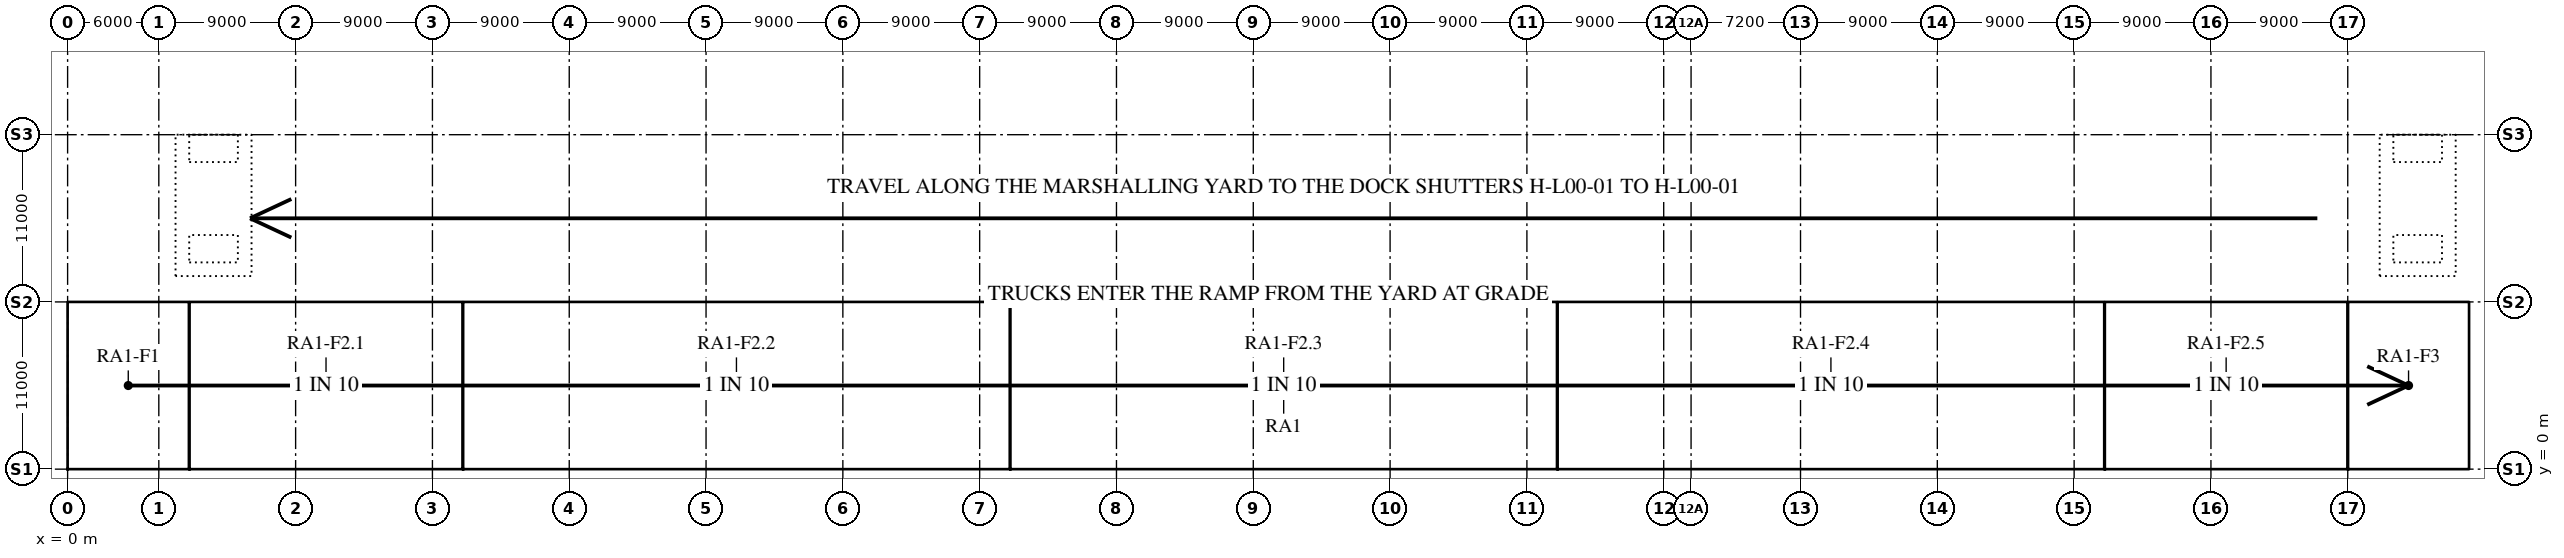
"""IFC4 building model, lengths in metres.
Left out: names, types, materials, properties, quantities, classifications, styles, units other than length and angle.
Written with IfcOpenShell. Run it as: python <this file> out.ifc"""

import sys

from ifc_helpers import new_model, si_unit, direction, frame, origin, origin_2d, place, context, subcontext, project, spatial, rectangle, extrude, element, save


model = new_model("IFC4")
c1 = context("Model", 3, precision=1e-05, world=origin(), true_north=direction((0.0, 1.0)))
c2 = subcontext(c1, "Body", "Model", "MODEL_VIEW")
j1 = project(units=[si_unit("LENGTHUNIT", "METRE"), si_unit("PLANEANGLEUNIT", "RADIAN")], contexts=[c1])
p1 = place(None, origin())
s1 = spatial("IfcSite", under=j1, at=p1, CompositionType="ELEMENT")
p2 = place(p1, origin())
s2 = spatial("IfcBuilding", under=s1, at=p2, CompositionType="ELEMENT")
p3 = place(p2, origin())
s3 = spatial("IfcBuildingStorey", under=s2, at=p3, CompositionType="ELEMENT", Elevation=0.0)
for number, where, z_axis, x_axis in (
    (1, (26.42, 0.4, -0.3), (0.0, 0.0, 1.0), (1.0, 0.0, 0.0)),
    (2, (26.42, 10.6, -0.3), (0.0, 0.0, 1.0), (1.0, 0.0, 0.0)),
):
    element("IfcColumn", number, at=place(p3, frame(where, z_axis=z_axis, x_axis=x_axis)), inside=s3, PredefinedType="COLUMN", context=c2, shape_type="SweptSolid", body=[
        extrude(rectangle(XDim=0.8, YDim=0.8, at=origin_2d()), origin(), (0.0, 0.0, 1.0), 1.03),
    ])
for number, where, z_axis, x_axis in (
    (3, (35.21, 0.4, -0.3), (0.0, 0.0, 1.0), (1.0, 0.0, 0.0)),
    (4, (35.21, 10.6, -0.3), (0.0, 0.0, 1.0), (1.0, 0.0, 0.0)),
):
    element("IfcColumn", number, at=place(p3, frame(where, z_axis=z_axis, x_axis=x_axis)), inside=s3, PredefinedType="COLUMN", context=c2, shape_type="SweptSolid", body=[
        extrude(rectangle(XDim=1.0, YDim=0.8, at=origin_2d()), origin(), (0.0, 0.0, 1.0), 1.874),
    ])
for number, where, z_axis, x_axis in (
    (5, (44.0, 0.4, -0.3), (0.0, 0.0, 1.0), (1.0, 0.0, 0.0)),
    (6, (44.0, 10.6, -0.3), (0.0, 0.0, 1.0), (1.0, 0.0, 0.0)),
):
    element("IfcColumn", number, at=place(p3, frame(where, z_axis=z_axis, x_axis=x_axis)), inside=s3, PredefinedType="COLUMN", context=c2, shape_type="SweptSolid", body=[
        extrude(rectangle(XDim=1.0, YDim=0.8, at=origin_2d()), origin(), (0.0, 0.0, 1.0), 2.752),
    ])
for number, where, z_axis, x_axis in (
    (7, (52.79, 0.4, -0.3), (0.0, 0.0, 1.0), (1.0, 0.0, 0.0)),
    (8, (52.79, 10.6, -0.3), (0.0, 0.0, 1.0), (1.0, 0.0, 0.0)),
):
    element("IfcColumn", number, at=place(p3, frame(where, z_axis=z_axis, x_axis=x_axis)), inside=s3, PredefinedType="COLUMN", context=c2, shape_type="SweptSolid", body=[
        extrude(rectangle(XDim=1.0, YDim=0.8, at=origin_2d()), origin(), (0.0, 0.0, 1.0), 3.632),
    ])
for number, where, z_axis, x_axis in (
    (9, (61.58, 0.4, -0.3), (0.0, 0.0, 1.0), (1.0, 0.0, 0.0)),
    (10, (61.58, 10.6, -0.3), (0.0, 0.0, 1.0), (1.0, 0.0, 0.0)),
):
    element("IfcColumn", number, at=place(p3, frame(where, z_axis=z_axis, x_axis=x_axis)), inside=s3, PredefinedType="COLUMN", context=c2, shape_type="SweptSolid", body=[
        extrude(rectangle(XDim=0.8, YDim=0.8, at=origin_2d()), origin(), (0.0, 0.0, 1.0), 4.51),
    ])
for number, where, z_axis, x_axis in (
    (11, (62.42, 0.4, -0.3), (0.0, 0.0, 1.0), (1.0, 0.0, 0.0)),
    (12, (62.42, 10.6, -0.3), (0.0, 0.0, 1.0), (1.0, 0.0, 0.0)),
):
    element("IfcColumn", number, at=place(p3, frame(where, z_axis=z_axis, x_axis=x_axis)), inside=s3, PredefinedType="COLUMN", context=c2, shape_type="SweptSolid", body=[
        extrude(rectangle(XDim=0.8, YDim=0.8, at=origin_2d()), origin(), (0.0, 0.0, 1.0), 4.629),
    ])
for number, where, z_axis, x_axis in (
    (13, (69.402, 0.4, -0.3), (0.0, 0.0, 1.0), (1.0, 0.0, 0.0)),
    (14, (69.402, 10.6, -0.3), (0.0, 0.0, 1.0), (1.0, 0.0, 0.0)),
):
    element("IfcColumn", number, at=place(p3, frame(where, z_axis=z_axis, x_axis=x_axis)), inside=s3, PredefinedType="COLUMN", context=c2, shape_type="SweptSolid", body=[
        extrude(rectangle(XDim=1.0, YDim=0.8, at=origin_2d()), origin(), (0.0, 0.0, 1.0), 5.293),
    ])
for number, where, z_axis, x_axis in (
    (15, (76.484, 0.4, -0.3), (0.0, 0.0, 1.0), (1.0, 0.0, 0.0)),
    (16, (76.484, 10.6, -0.3), (0.0, 0.0, 1.0), (1.0, 0.0, 0.0)),
    (17, (83.516, 0.4, -0.3), (0.0, 0.0, 1.0), (1.0, 0.0, 0.0)),
    (18, (83.516, 10.6, -0.3), (0.0, 0.0, 1.0), (1.0, 0.0, 0.0)),
    (19, (90.548, 0.4, -0.3), (0.0, 0.0, 1.0), (1.0, 0.0, 0.0)),
    (20, (90.548, 10.6, -0.3), (0.0, 0.0, 1.0), (1.0, 0.0, 0.0)),
):
    element("IfcColumn", number, at=place(p3, frame(where, z_axis=z_axis, x_axis=x_axis)), inside=s3, PredefinedType="COLUMN", context=c2, shape_type="SweptSolid", body=[
        extrude(rectangle(XDim=1.0, YDim=0.8, at=origin_2d()), origin(), (0.0, 0.0, 1.0), 5.3),
    ])
for number, where, z_axis, x_axis in (
    (21, (97.58, 0.4, -0.3), (0.0, 0.0, 1.0), (1.0, 0.0, 0.0)),
    (22, (97.58, 10.6, -0.3), (0.0, 0.0, 1.0), (1.0, 0.0, 0.0)),
    (23, (98.42, 0.4, -0.3), (0.0, 0.0, 1.0), (1.0, 0.0, 0.0)),
    (24, (98.42, 10.6, -0.3), (0.0, 0.0, 1.0), (1.0, 0.0, 0.0)),
):
    element("IfcColumn", number, at=place(p3, frame(where, z_axis=z_axis, x_axis=x_axis)), inside=s3, PredefinedType="COLUMN", context=c2, shape_type="SweptSolid", body=[
        extrude(rectangle(XDim=0.8, YDim=0.8, at=origin_2d()), origin(), (0.0, 0.0, 1.0), 5.3),
    ])
for number, where, z_axis, x_axis in (
    (25, (105.452, 0.4, -0.3), (0.0, 0.0, 1.0), (1.0, 0.0, 0.0)),
    (26, (105.452, 10.6, -0.3), (0.0, 0.0, 1.0), (1.0, 0.0, 0.0)),
    (27, (112.484, 0.4, -0.3), (0.0, 0.0, 1.0), (1.0, 0.0, 0.0)),
    (28, (112.484, 10.6, -0.3), (0.0, 0.0, 1.0), (1.0, 0.0, 0.0)),
    (29, (119.416, 0.4, -0.3), (0.0, 0.0, 1.0), (1.0, 0.0, 0.0)),
    (30, (119.416, 10.6, -0.3), (0.0, 0.0, 1.0), (1.0, 0.0, 0.0)),
    (31, (126.548, 0.4, -0.3), (0.0, 0.0, 1.0), (1.0, 0.0, 0.0)),
    (32, (126.548, 10.6, -0.3), (0.0, 0.0, 1.0), (1.0, 0.0, 0.0)),
):
    element("IfcColumn", number, at=place(p3, frame(where, z_axis=z_axis, x_axis=x_axis)), inside=s3, PredefinedType="COLUMN", context=c2, shape_type="SweptSolid", body=[
        extrude(rectangle(XDim=1.0, YDim=0.8, at=origin_2d()), origin(), (0.0, 0.0, 1.0), 5.3),
    ])
for number, where, z_axis, x_axis in (
    (33, (133.58, 0.4, -0.3), (0.0, 0.0, 1.0), (1.0, 0.0, 0.0)),
    (34, (133.58, 10.6, -0.3), (0.0, 0.0, 1.0), (1.0, 0.0, 0.0)),
    (35, (134.42, 0.4, -0.3), (0.0, 0.0, 1.0), (1.0, 0.0, 0.0)),
    (36, (134.42, 10.6, -0.3), (0.0, 0.0, 1.0), (1.0, 0.0, 0.0)),
):
    element("IfcColumn", number, at=place(p3, frame(where, z_axis=z_axis, x_axis=x_axis)), inside=s3, PredefinedType="COLUMN", context=c2, shape_type="SweptSolid", body=[
        extrude(rectangle(XDim=0.8, YDim=0.8, at=origin_2d()), origin(), (0.0, 0.0, 1.0), 5.3),
    ])
for number, where, z_axis, x_axis in (
    (37, (142.0, 0.4, -0.3), (0.0, 0.0, 1.0), (1.0, 0.0, 0.0)),
    (38, (142.0, 10.6, -0.3), (0.0, 0.0, 1.0), (1.0, 0.0, 0.0)),
):
    element("IfcColumn", number, at=place(p3, frame(where, z_axis=z_axis, x_axis=x_axis)), inside=s3, PredefinedType="COLUMN", context=c2, shape_type="SweptSolid", body=[
        extrude(rectangle(XDim=1.0, YDim=0.8, at=origin_2d()), origin(), (0.0, 0.0, 1.0), 5.3),
    ])
for number, where, z_axis, x_axis in (
    (39, (149.58, 0.4, -0.3), (0.0, 0.0, 1.0), (1.0, 0.0, 0.0)),
    (40, (149.58, 10.6, -0.3), (0.0, 0.0, 1.0), (1.0, 0.0, 0.0)),
    (41, (150.42, 0.4, -0.3), (0.0, 0.0, 1.0), (1.0, 0.0, 0.0)),
    (42, (150.42, 10.6, -0.3), (0.0, 0.0, 1.0), (1.0, 0.0, 0.0)),
    (43, (157.58, 0.4, -0.3), (0.0, 0.0, 1.0), (1.0, 0.0, 0.0)),
    (44, (157.58, 10.6, -0.3), (0.0, 0.0, 1.0), (1.0, 0.0, 0.0)),
):
    element("IfcColumn", number, at=place(p3, frame(where, z_axis=z_axis, x_axis=x_axis)), inside=s3, PredefinedType="COLUMN", context=c2, shape_type="SweptSolid", body=[
        extrude(rectangle(XDim=0.8, YDim=0.8, at=origin_2d()), origin(), (0.0, 0.0, 1.0), 5.3),
    ])
p4 = place(p3, frame((6.4, 22.5, -0.3), z_axis=(0.0, 0.0, 1.0), x_axis=(1.0, 0.0, 0.0)))
e45 = element("IfcColumn", 45, at=p4, inside=s3, PredefinedType="COLUMN", context=c2, shape_type="SweptSolid", body=[
    extrude(rectangle(XDim=0.8, YDim=1.0, at=origin_2d()), origin(), (0.0, 0.0, 1.0), 5.3),
])
for number, where, z_axis, x_axis in (
    (46, (15.0, 22.5, -0.3), (0.0, 0.0, 1.0), (1.0, 0.0, 0.0)),
    (47, (24.0, 22.5, -0.3), (0.0, 0.0, 1.0), (1.0, 0.0, 0.0)),
    (48, (33.0, 22.5, -0.3), (0.0, 0.0, 1.0), (1.0, 0.0, 0.0)),
    (49, (42.0, 22.5, -0.3), (0.0, 0.0, 1.0), (1.0, 0.0, 0.0)),
):
    element("IfcColumn", number, at=place(p3, frame(where, z_axis=z_axis, x_axis=x_axis)), inside=s3, PredefinedType="COLUMN", context=c2, shape_type="SweptSolid", body=[
        extrude(rectangle(XDim=1.0, YDim=1.0, at=origin_2d()), origin(), (0.0, 0.0, 1.0), 5.3),
    ])
for number, where, z_axis, x_axis in (
    (50, (50.5, 22.5, -0.3), (0.0, 0.0, 1.0), (1.0, 0.0, 0.0)),
    (51, (51.5, 22.5, -0.3), (0.0, 0.0, 1.0), (1.0, 0.0, 0.0)),
):
    element("IfcColumn", number, at=place(p3, frame(where, z_axis=z_axis, x_axis=x_axis)), inside=s3, PredefinedType="COLUMN", context=c2, shape_type="SweptSolid", body=[
        extrude(rectangle(XDim=0.8, YDim=1.0, at=origin_2d()), origin(), (0.0, 0.0, 1.0), 5.3),
    ])
for number, where, z_axis, x_axis in (
    (52, (60.0, 22.5, -0.3), (0.0, 0.0, 1.0), (1.0, 0.0, 0.0)),
    (53, (69.0, 22.5, -0.3), (0.0, 0.0, 1.0), (1.0, 0.0, 0.0)),
    (54, (78.0, 22.5, -0.3), (0.0, 0.0, 1.0), (1.0, 0.0, 0.0)),
    (55, (87.0, 22.5, -0.3), (0.0, 0.0, 1.0), (1.0, 0.0, 0.0)),
    (56, (96.0, 22.5, -0.3), (0.0, 0.0, 1.0), (1.0, 0.0, 0.0)),
):
    element("IfcColumn", number, at=place(p3, frame(where, z_axis=z_axis, x_axis=x_axis)), inside=s3, PredefinedType="COLUMN", context=c2, shape_type="SweptSolid", body=[
        extrude(rectangle(XDim=1.0, YDim=1.0, at=origin_2d()), origin(), (0.0, 0.0, 1.0), 5.3),
    ])
for number, where, z_axis, x_axis in (
    (57, (105.4, 22.5, -0.3), (0.0, 0.0, 1.0), (1.0, 0.0, 0.0)),
    (58, (106.4, 22.5, -0.3), (0.0, 0.0, 1.0), (1.0, 0.0, 0.0)),
):
    element("IfcColumn", number, at=place(p3, frame(where, z_axis=z_axis, x_axis=x_axis)), inside=s3, PredefinedType="COLUMN", context=c2, shape_type="SweptSolid", body=[
        extrude(rectangle(XDim=0.8, YDim=1.0, at=origin_2d()), origin(), (0.0, 0.0, 1.0), 5.3),
    ])
for number, where, z_axis, x_axis in (
    (59, (114.0, 22.5, -0.3), (0.0, 0.0, 1.0), (1.0, 0.0, 0.0)),
    (60, (123.0, 22.5, -0.3), (0.0, 0.0, 1.0), (1.0, 0.0, 0.0)),
    (61, (132.0, 22.5, -0.3), (0.0, 0.0, 1.0), (1.0, 0.0, 0.0)),
    (62, (141.0, 22.5, -0.3), (0.0, 0.0, 1.0), (1.0, 0.0, 0.0)),
    (63, (150.0, 22.5, -0.3), (0.0, 0.0, 1.0), (1.0, 0.0, 0.0)),
):
    element("IfcColumn", number, at=place(p3, frame(where, z_axis=z_axis, x_axis=x_axis)), inside=s3, PredefinedType="COLUMN", context=c2, shape_type="SweptSolid", body=[
        extrude(rectangle(XDim=1.0, YDim=1.0, at=origin_2d()), origin(), (0.0, 0.0, 1.0), 5.3),
    ])
p5 = place(p3, frame((157.58, 22.5, -0.3), z_axis=(0.0, 0.0, 1.0), x_axis=(1.0, 0.0, 0.0)))
e64 = element("IfcColumn", 64, at=p5, inside=s3, PredefinedType="COLUMN", context=c2, shape_type="SweptSolid", body=[
    extrude(rectangle(XDim=0.8, YDim=1.0, at=origin_2d()), origin(), (0.0, 0.0, 1.0), 5.3),
])
for number, where, z_axis, x_axis in (
    (65, (158.5, 0.45, -0.3), (0.0, 0.0, 1.0), (1.0, 0.0, 0.0)),
    (66, (158.5, 11.7, -0.3), (0.0, 0.0, 1.0), (1.0, 0.0, 0.0)),
    (67, (158.5, 23.0, -0.3), (0.0, 0.0, 1.0), (1.0, 0.0, 0.0)),
):
    element("IfcColumn", number, at=place(p3, frame(where, z_axis=z_axis, x_axis=x_axis)), inside=s3, PredefinedType="COLUMN", context=c2, shape_type="SweptSolid", body=[
        extrude(rectangle(XDim=0.9, YDim=0.9, at=origin_2d()), origin(), (0.0, 0.0, 1.0), 5.3),
    ])
for number, where, z_axis, x_axis in (
    (68, (7.825, 21.8, -0.3), (0.0, 0.0, 1.0), (1.0, 0.0, 0.0)),
    (69, (7.825, 20.35, -0.3), (0.0, 0.0, 1.0), (1.0, 0.0, 0.0)),
    (70, (7.825, 15.25, -0.3), (0.0, 0.0, 1.0), (1.0, 0.0, 0.0)),
    (71, (7.825, 13.75, -0.3), (0.0, 0.0, 1.0), (1.0, 0.0, 0.0)),
    (72, (11.375, 21.8, -0.3), (0.0, 0.0, 1.0), (1.0, 0.0, 0.0)),
    (73, (11.375, 20.35, -0.3), (0.0, 0.0, 1.0), (1.0, 0.0, 0.0)),
    (74, (11.375, 15.25, -0.3), (0.0, 0.0, 1.0), (1.0, 0.0, 0.0)),
    (75, (11.375, 13.75, -0.3), (0.0, 0.0, 1.0), (1.0, 0.0, 0.0)),
    (76, (152.825, 21.8, -0.3), (0.0, 0.0, 1.0), (1.0, 0.0, 0.0)),
    (77, (152.825, 20.35, -0.3), (0.0, 0.0, 1.0), (1.0, 0.0, 0.0)),
    (78, (152.825, 15.25, -0.3), (0.0, 0.0, 1.0), (1.0, 0.0, 0.0)),
    (79, (152.825, 13.75, -0.3), (0.0, 0.0, 1.0), (1.0, 0.0, 0.0)),
    (80, (156.375, 21.8, -0.3), (0.0, 0.0, 1.0), (1.0, 0.0, 0.0)),
    (81, (156.375, 20.35, -0.3), (0.0, 0.0, 1.0), (1.0, 0.0, 0.0)),
    (82, (156.375, 15.25, -0.3), (0.0, 0.0, 1.0), (1.0, 0.0, 0.0)),
    (83, (156.375, 13.75, -0.3), (0.0, 0.0, 1.0), (1.0, 0.0, 0.0)),
):
    element("IfcColumn", number, at=place(p3, frame(where, z_axis=z_axis, x_axis=x_axis)), inside=s3, PredefinedType="COLUMN", context=c2, shape_type="SweptSolid", body=[
        extrude(rectangle(XDim=0.35, YDim=0.35, at=origin_2d()), origin(), (0.0, 0.0, 1.0), 5.3),
    ])
save(model, sys.argv[1])
